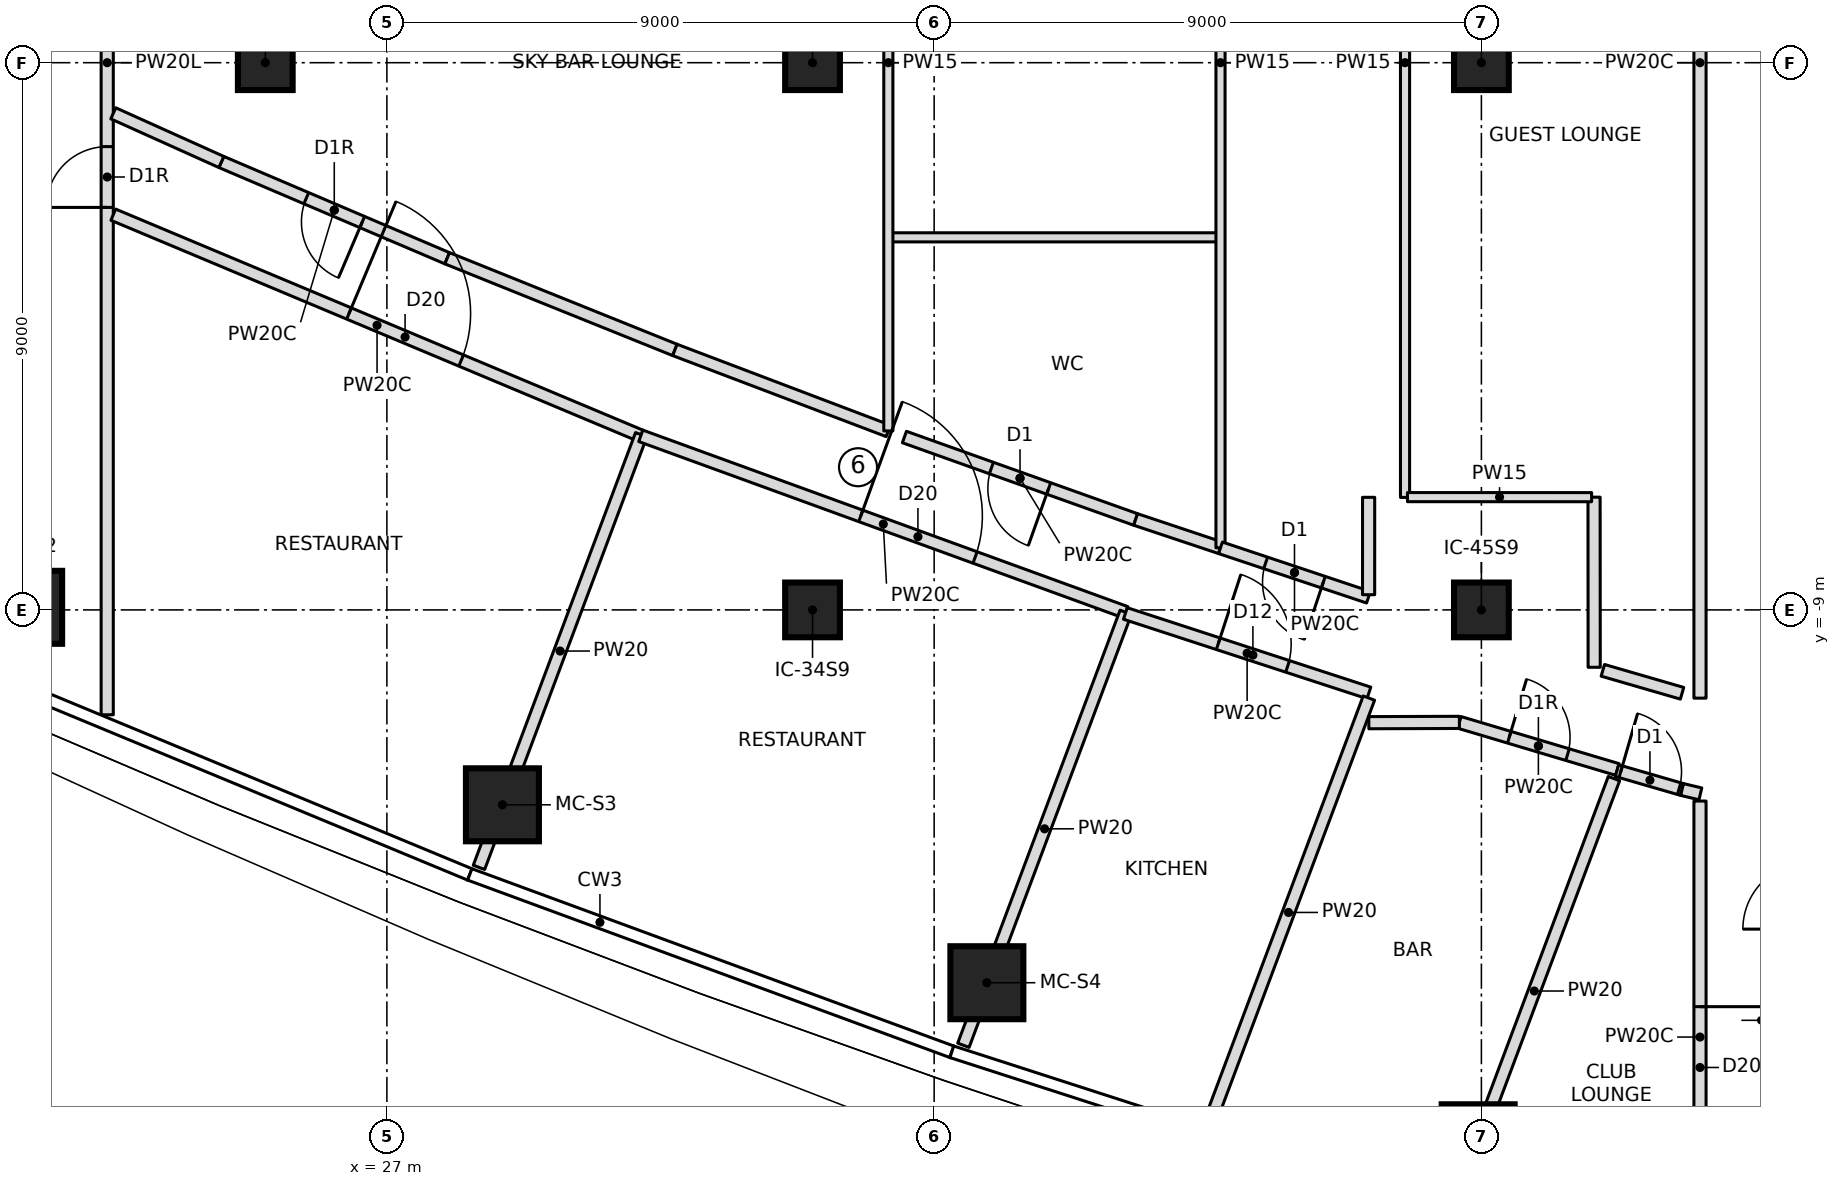
"""IFC4 building model, lengths in metres.
Left out: names, types, materials, properties, quantities, classifications, styles, units other than length and angle.
Written with IfcOpenShell. Run it as: python <this file> out.ifc"""

import sys

from ifc_helpers import new_model, si_unit, direction, frame, frame_2d, origin, origin_2d, place, context, subcontext, project, spatial, rectangle, extrude, element, fill, save


model = new_model("IFC4")
c1 = context("Model", 3, precision=1e-05, world=origin(), true_north=direction((0.0, 1.0)))
c2 = subcontext(c1, "Body", "Model", "MODEL_VIEW")
j1 = project(units=[si_unit("LENGTHUNIT", "METRE"), si_unit("PLANEANGLEUNIT", "RADIAN")], contexts=[c1])
p1 = place(None, origin())
s1 = spatial("IfcSite", under=j1, at=p1, CompositionType="ELEMENT")
p2 = place(p1, origin())
s2 = spatial("IfcBuilding", under=s1, at=p2, CompositionType="ELEMENT")
p3 = place(p2, frame((0.0, 0.0, 216.2)))
s3 = spatial("IfcBuildingStorey", under=s2, at=p3, CompositionType="ELEMENT", Elevation=216.2)
for number, where, z_axis, x_axis in (
    (1, (21.059, -8.958, 0.0), (0.0, 0.0, 1.0), (1.0, 0.0, 0.0)),
    (2, (28.9, -12.205, 0.0), (0.0, 0.0, 1.0), (1.0, 0.0, 0.0)),
    (3, (36.867, -15.132, 0.0), (0.0, 0.0, 1.0), (1.0, 0.0, 0.0)),
    (4, (44.947, -17.731, 0.0), (0.0, 0.0, 1.0), (1.0, 0.0, 0.0)),
):
    element("IfcColumn", number, at=place(p3, frame(where, z_axis=z_axis, x_axis=x_axis)), inside=s3, PredefinedType="COLUMN", context=c2, shape_type="SweptSolid", body=[
        extrude(rectangle(XDim=1.2, YDim=1.2, at=origin_2d()), origin(), (0.0, 0.0, 1.0), 4.6),
    ])
for number, where, z_axis, x_axis in (
    (5, (25.0, 0.0, 0.0), (0.0, 0.0, 1.0), (1.0, 0.0, 0.0)),
    (6, (34.0, -9.0, 0.0), (0.0, 0.0, 1.0), (1.0, 0.0, 0.0)),
    (7, (34.0, 0.0, 0.0), (0.0, 0.0, 1.0), (1.0, 0.0, 0.0)),
    (8, (45.0, -9.0, 0.0), (0.0, 0.0, 1.0), (1.0, 0.0, 0.0)),
    (9, (45.0, 0.0, 0.0), (0.0, 0.0, 1.0), (1.0, 0.0, 0.0)),
):
    element("IfcColumn", number, at=place(p3, frame(where, z_axis=z_axis, x_axis=x_axis)), inside=s3, PredefinedType="COLUMN", context=c2, shape_type="SweptSolid", body=[
        extrude(rectangle(XDim=0.9, YDim=0.9, at=origin_2d()), origin(), (0.0, 0.0, 1.0), 4.6),
    ])
p4 = place(p3, frame((22.401, -10.725, 0.0), z_axis=(0.0, 0.0, 1.0), x_axis=(0.0, 1.0, 0.0)))
e10 = element("IfcWall", 10, at=p4, inside=s3, PredefinedType="PARTITIONING", context=c2, shape_type="SweptSolid", body=[
    extrude(rectangle(XDim=21.45, YDim=0.2, at=frame_2d((10.725, 0.0))), origin(), (0.0, 0.0, 1.0), 4.3),
])
p5 = place(p4, frame((12.106, 0.0, 0.0)))
e11 = element("IfcOpeningElement", 11, at=p5, cuts=e10, PredefinedType="OPENING", context=c2, shape_type="SweptSolid", body=[
    extrude(rectangle(XDim=1.0, YDim=2.1, at=frame_2d((0.5, 1.05))), frame((0.0, 0.11, 0.0), z_axis=(0.0, -1.0, 0.0), x_axis=(1.0, 0.0, 0.0)), (0.0, 0.0, 1.0), 0.22),
])
p6 = place(p4, frame((8.345, 0.0, 0.0)))
e12 = element("IfcOpeningElement", 12, at=p6, cuts=e10, PredefinedType="OPENING", context=c2, shape_type="SweptSolid", body=[
    extrude(rectangle(XDim=1.0, YDim=2.1, at=frame_2d((0.5, 1.05))), frame((0.0, 0.11, 0.0), z_axis=(0.0, -1.0, 0.0), x_axis=(1.0, 0.0, 0.0)), (0.0, 0.0, 1.0), 0.22),
])
p7 = place(p3, frame((22.5, -2.5, 0.0), z_axis=(0.0, 0.0, 1.0), x_axis=(0.922225430975, -0.386652627643, 0.0)))
e13 = element("IfcWall", 13, at=p7, inside=s3, PredefinedType="PARTITIONING", context=c2, shape_type="SweptSolid", body=[
    extrude(rectangle(XDim=9.407, YDim=0.2, at=frame_2d((4.704, 0.0))), origin(), (0.0, 0.0, 1.0), 4.3),
])
p8 = place(p7, frame((4.203, 0.0, 0.0)))
e14 = element("IfcOpeningElement", 14, at=p8, cuts=e13, PredefinedType="OPENING", context=c2, shape_type="SweptSolid", body=[
    extrude(rectangle(XDim=2.0, YDim=2.4, at=frame_2d((1.0, 1.2))), frame((0.0, 0.11, 0.0), z_axis=(0.0, -1.0, 0.0), x_axis=(1.0, 0.0, 0.0)), (0.0, 0.0, 1.0), 0.22),
])
p9 = place(p3, frame((28.514, -13.235, 0.0), z_axis=(0.0, 0.0, 1.0), x_axis=(0.351137522904, 0.936323896955, 0.0)))
e15 = element("IfcWall", 15, at=p9, inside=s3, PredefinedType="PARTITIONING", context=c2, shape_type="SweptSolid", body=[
    extrude(rectangle(XDim=7.6, YDim=0.2, at=frame_2d((3.8, 0.0))), origin(), (0.0, 0.0, 1.0), 4.3),
])
p10 = place(p3, frame((31.176, -6.137, 0.0), z_axis=(0.0, 0.0, 1.0), x_axis=(0.939697645913, -0.342006336585, 0.0)))
e16 = element("IfcWall", 16, at=p10, inside=s3, PredefinedType="PARTITIONING", context=c2, shape_type="SweptSolid", body=[
    extrude(rectangle(XDim=8.488, YDim=0.2, at=frame_2d((4.244, 0.0))), origin(), (0.0, 0.0, 1.0), 4.3),
])
p11 = place(p10, frame((3.85, 0.0, 0.0)))
e17 = element("IfcOpeningElement", 17, at=p11, cuts=e16, PredefinedType="OPENING", context=c2, shape_type="SweptSolid", body=[
    extrude(rectangle(XDim=2.0, YDim=2.4, at=frame_2d((1.0, 1.2))), frame((0.0, 0.11, 0.0), z_axis=(0.0, -1.0, 0.0), x_axis=(1.0, 0.0, 0.0)), (0.0, 0.0, 1.0), 0.22),
])
p12 = place(p3, frame((36.481, -16.161, 0.0), z_axis=(0.0, 0.0, 1.0), x_axis=(0.351133995718, 0.936325219703, 0.0)))
e18 = element("IfcWall", 18, at=p12, inside=s3, PredefinedType="PARTITIONING", context=c2, shape_type="SweptSolid", body=[
    extrude(rectangle(XDim=7.605, YDim=0.2, at=frame_2d((3.803, 0.0))), origin(), (0.0, 0.0, 1.0), 4.3),
])
p13 = place(p3, frame((39.145, -9.059, 0.0), z_axis=(0.0, 0.0, 1.0), x_axis=(0.950709044073, -0.310084365161, 0.0)))
e19 = element("IfcWall", 19, at=p13, inside=s3, PredefinedType="PARTITIONING", context=c2, shape_type="SweptSolid", body=[
    extrude(rectangle(XDim=4.213, YDim=0.2, at=frame_2d((2.106, 0.0))), origin(), (0.0, 0.0, 1.0), 4.3),
])
p14 = place(p13, frame((1.607, 0.0, 0.0)))
e20 = element("IfcOpeningElement", 20, at=p14, cuts=e19, PredefinedType="OPENING", context=c2, shape_type="SweptSolid", body=[
    extrude(rectangle(XDim=1.2, YDim=2.1, at=frame_2d((0.6, 1.05))), frame((0.0, 0.11, 0.0), z_axis=(0.0, -1.0, 0.0), x_axis=(1.0, 0.0, 0.0)), (0.0, 0.0, 1.0), 0.22),
])
p15 = place(p3, frame((40.506, -17.501, 0.0), z_axis=(0.0, 0.0, 1.0), x_axis=(0.351119888923, 0.936330509811, 0.0)))
e21 = element("IfcWall", 21, at=p15, inside=s3, PredefinedType="PARTITIONING", context=c2, shape_type="SweptSolid", body=[
    extrude(rectangle(XDim=7.531, YDim=0.2, at=frame_2d((3.766, 0.0))), origin(), (0.0, 0.0, 1.0), 4.3),
])
p16 = place(p3, frame((44.638, -10.85, 0.0), z_axis=(0.0, 0.0, 1.0), x_axis=(0.95835737874, -0.285571592801, 0.0)))
e22 = element("IfcWall", 22, at=p16, inside=s3, PredefinedType="PARTITIONING", context=c2, shape_type="SweptSolid", body=[
    extrude(rectangle(XDim=2.712, YDim=0.2, at=frame_2d((1.356, 0.0))), origin(), (0.0, 0.0, 1.0), 4.3),
])
p17 = place(p16, frame((0.856, 0.0, 0.0)))
e23 = element("IfcOpeningElement", 23, at=p17, cuts=e22, PredefinedType="OPENING", context=c2, shape_type="SweptSolid", body=[
    extrude(rectangle(XDim=1.0, YDim=2.1, at=frame_2d((0.5, 1.05))), frame((0.0, 0.11, 0.0), z_axis=(0.0, -1.0, 0.0), x_axis=(1.0, 0.0, 0.0)), (0.0, 0.0, 1.0), 0.22),
])
p18 = place(p3, frame((44.56, -18.762, 0.0), z_axis=(0.0, 0.0, 1.0), x_axis=(0.351109100247, 0.936334555447, 0.0)))
e24 = element("IfcWall", 24, at=p18, inside=s3, PredefinedType="PARTITIONING", context=c2, shape_type="SweptSolid", body=[
    extrude(rectangle(XDim=7.462, YDim=0.2, at=frame_2d((3.731, 0.0))), origin(), (0.0, 0.0, 1.0), 4.3),
])
p19 = place(p3, frame((27.992, -3.216, 0.0), z_axis=(0.0, 0.0, 1.0), x_axis=(-0.919906458601, 0.392137867878, 0.0)))
e25 = element("IfcWall", 25, at=p19, inside=s3, PredefinedType="PARTITIONING", context=c2, shape_type="SweptSolid", body=[
    extrude(rectangle(XDim=4.038, YDim=0.2, at=frame_2d((2.019, 0.0))), origin(), (0.0, 0.0, 1.0), 4.3),
])
p20 = place(p19, frame((1.519, 0.0, 0.0)))
e26 = element("IfcOpeningElement", 26, at=p20, cuts=e25, PredefinedType="OPENING", context=c2, shape_type="SweptSolid", body=[
    extrude(rectangle(XDim=1.0, YDim=2.1, at=frame_2d((0.5, 1.05))), frame((0.0, 0.11, 0.0), z_axis=(0.0, -1.0, 0.0), x_axis=(1.0, 0.0, 0.0)), (0.0, 0.0, 1.0), 0.22),
])
p21 = place(p3, frame((31.737, -4.724, 0.0), z_axis=(0.0, 0.0, 1.0), x_axis=(-0.927631817384, 0.37349593221, 0.0)))
e27 = element("IfcWall", 27, at=p21, inside=s3, PredefinedType="PARTITIONING", context=c2, shape_type="SweptSolid", body=[
    extrude(rectangle(XDim=4.037, YDim=0.2, at=frame_2d((2.019, 0.0))), origin(), (0.0, 0.0, 1.0), 4.3),
])
p22 = place(p3, frame((24.278, -1.633, 0.0), z_axis=(0.0, 0.0, 1.0), x_axis=(-0.911806621171, 0.410619879681, 0.0)))
e28 = element("IfcWall", 28, at=p22, inside=s3, PredefinedType="PARTITIONING", context=c2, shape_type="SweptSolid", body=[
    extrude(rectangle(XDim=1.949, YDim=0.2, at=frame_2d((0.975, 0.0))), origin(), (0.0, 0.0, 1.0), 4.3),
])
p23 = place(p3, frame((35.247, -6.056, 0.0), z_axis=(0.0, 0.0, 1.0), x_axis=(-0.934948443449, 0.354783607418, 0.0)))
e29 = element("IfcWall", 29, at=p23, inside=s3, PredefinedType="PARTITIONING", context=c2, shape_type="SweptSolid", body=[
    extrude(rectangle(XDim=3.754, YDim=0.2, at=frame_2d((1.877, 0.0))), origin(), (0.0, 0.0, 1.0), 4.3),
])
p24 = place(p3, frame((35.247, -2.872, 0.0), z_axis=(0.0, 0.0, 1.0), x_axis=(1.0, 0.0, 0.0)))
e30 = element("IfcWall", 30, at=p24, inside=s3, PredefinedType="PARTITIONING", context=c2, shape_type="SweptSolid", body=[
    extrude(rectangle(XDim=5.463, YDim=0.15, at=frame_2d((2.731, 0.0))), origin(), (0.0, 0.0, 1.0), 4.3),
])
p25 = place(p3, frame((35.247, -6.056, 0.0), z_axis=(0.0, 0.0, 1.0), x_axis=(0.0, 1.0, 0.0)))
e31 = element("IfcWall", 31, at=p25, inside=s3, PredefinedType="PARTITIONING", context=c2, shape_type="SweptSolid", body=[
    extrude(rectangle(XDim=12.112, YDim=0.15, at=frame_2d((6.056, 0.0))), origin(), (0.0, 0.0, 1.0), 4.3),
])
p26 = place(p3, frame((39.314, -7.512, 0.0), z_axis=(0.0, 0.0, 1.0), x_axis=(-0.941904619678, 0.335880465983, 0.0)))
e32 = element("IfcWall", 32, at=p26, inside=s3, PredefinedType="PARTITIONING", context=c2, shape_type="SweptSolid", body=[
    extrude(rectangle(XDim=4.037, YDim=0.2, at=frame_2d((2.019, 0.0))), origin(), (0.0, 0.0, 1.0), 4.3),
])
p27 = place(p26, frame((1.519, 0.0, 0.0)))
e33 = element("IfcOpeningElement", 33, at=p27, cuts=e32, PredefinedType="OPENING", context=c2, shape_type="SweptSolid", body=[
    extrude(rectangle(XDim=1.0, YDim=2.1, at=frame_2d((0.5, 1.05))), frame((0.0, 0.11, 0.0), z_axis=(0.0, -1.0, 0.0), x_axis=(1.0, 0.0, 0.0)), (0.0, 0.0, 1.0), 0.22),
])
p28 = place(p3, frame((40.709, -7.979, 0.0), z_axis=(0.0, 0.0, 1.0), x_axis=(-0.94846740352, 0.316874714137, 0.0)))
e34 = element("IfcWall", 34, at=p28, inside=s3, PredefinedType="PARTITIONING", context=c2, shape_type="SweptSolid", body=[
    extrude(rectangle(XDim=1.472, YDim=0.2, at=frame_2d((0.736, 0.0))), origin(), (0.0, 0.0, 1.0), 4.3),
])
p29 = place(p3, frame((40.709, -7.979, 0.0), z_axis=(0.0, 0.0, 1.0), x_axis=(0.0, 1.0, 0.0)))
e35 = element("IfcWall", 35, at=p29, inside=s3, PredefinedType="PARTITIONING", context=c2, shape_type="SweptSolid", body=[
    extrude(rectangle(XDim=15.958, YDim=0.15, at=frame_2d((7.979, 0.0))), origin(), (0.0, 0.0, 1.0), 4.3),
])
p30 = place(p3, frame((43.143, -8.792, 0.0), z_axis=(0.0, 0.0, 1.0), x_axis=(-0.948473756095, 0.316855699016, 0.0)))
e36 = element("IfcWall", 36, at=p30, inside=s3, PredefinedType="PARTITIONING", context=c2, shape_type="SweptSolid", body=[
    extrude(rectangle(XDim=2.566, YDim=0.2, at=frame_2d((1.283, 0.0))), origin(), (0.0, 0.0, 1.0), 4.3),
])
p31 = place(p30, frame((0.783, 0.0, 0.0)))
e37 = element("IfcOpeningElement", 37, at=p31, cuts=e36, PredefinedType="OPENING", context=c2, shape_type="SweptSolid", body=[
    extrude(rectangle(XDim=1.0, YDim=2.1, at=frame_2d((0.5, 1.05))), frame((0.0, 0.11, 0.0), z_axis=(0.0, -1.0, 0.0), x_axis=(1.0, 0.0, 0.0)), (0.0, 0.0, 1.0), 0.22),
])
p32 = place(p3, frame((43.744, -7.15, 0.0), z_axis=(0.0, 0.0, 1.0), x_axis=(0.0, 1.0, 0.0)))
e38 = element("IfcWall", 38, at=p32, inside=s3, PredefinedType="PARTITIONING", context=c2, shape_type="SweptSolid", body=[
    extrude(rectangle(XDim=14.3, YDim=0.15, at=frame_2d((7.15, 0.0))), origin(), (0.0, 0.0, 1.0), 4.3),
])
p33 = place(p3, frame((47.23, -11.643, 0.0), z_axis=(0.0, 0.0, 1.0), x_axis=(0.960450233741, -0.278451698696, 0.0)))
e39 = element("IfcWall", 39, at=p33, inside=s3, PredefinedType="PARTITIONING", context=c2, shape_type="SweptSolid", body=[
    extrude(rectangle(XDim=1.115, YDim=0.2, at=frame_2d((0.557, 0.0))), origin(), (0.0, 0.0, 1.0), 4.3),
])
p34 = place(p33, frame((0.064, 0.0, 0.0)))
e40 = element("IfcOpeningElement", 40, at=p34, cuts=e39, PredefinedType="OPENING", context=c2, shape_type="SweptSolid", body=[
    extrude(rectangle(XDim=1.0, YDim=2.1, at=frame_2d((0.5, 1.05))), frame((0.0, 0.11, 0.0), z_axis=(0.0, -1.0, 0.0), x_axis=(1.0, 0.0, 0.0)), (0.0, 0.0, 1.0), 0.22),
])
p35 = place(p3, frame((48.3, -10.371, 0.0), z_axis=(0.0, 0.0, 1.0), x_axis=(-0.960450321583, 0.278451395706, 0.0)))
e41 = element("IfcWall", 41, at=p35, inside=s3, PredefinedType="PARTITIONING", context=c2, shape_type="SweptSolid", body=[
    extrude(rectangle(XDim=1.356, YDim=0.2, at=frame_2d((0.678, 0.0))), origin(), (0.0, 0.0, 1.0), 4.3),
])
p36 = place(p3, frame((43.146, -7.148, 0.0), z_axis=(0.0, 0.0, 1.0), x_axis=(-0.000304785112, -0.999999953553, 0.0)))
e42 = element("IfcWall", 42, at=p36, inside=s3, PredefinedType="PARTITIONING", context=c2, shape_type="SweptSolid", body=[
    extrude(rectangle(XDim=1.602, YDim=0.2, at=frame_2d((0.801, 0.0))), origin(), (0.0, 0.0, 1.0), 4.3),
])
p37 = place(p3, frame((48.595, 10.451, 0.0), z_axis=(0.0, 0.0, 1.0), x_axis=(0.0, -1.0, 0.0)))
e43 = element("IfcWall", 43, at=p37, inside=s3, PredefinedType="PARTITIONING", context=c2, shape_type="SweptSolid", body=[
    extrude(rectangle(XDim=20.903, YDim=0.2, at=frame_2d((10.451, 0.0))), origin(), (0.0, 0.0, 1.0), 4.3),
])
p38 = place(p3, frame((46.855, -9.944, 0.0), z_axis=(0.0, 0.0, 1.0), x_axis=(-0.000785271549, 0.999999691674, 0.0)))
e44 = element("IfcWall", 44, at=p38, inside=s3, PredefinedType="PARTITIONING", context=c2, shape_type="SweptSolid", body=[
    extrude(rectangle(XDim=2.798, YDim=0.2, at=frame_2d((1.399, 0.0))), origin(), (0.0, 0.0, 1.0), 4.3),
])
p39 = place(p3, frame((46.813, -7.146, 0.0), z_axis=(0.0, 0.0, 1.0), x_axis=(-0.999999970757, 0.000241837961, 0.0)))
e45 = element("IfcWall", 45, at=p39, inside=s3, PredefinedType="PARTITIONING", context=c2, shape_type="SweptSolid", body=[
    extrude(rectangle(XDim=3.029, YDim=0.15, at=frame_2d((1.514, 0.0))), origin(), (0.0, 0.0, 1.0), 4.3),
])
p40 = place(p3, frame((43.148, -10.855, 0.0), z_axis=(0.0, 0.0, 1.0), x_axis=(0.999995150779, 0.003114228465, 0.0)))
e46 = element("IfcWall", 46, at=p40, inside=s3, PredefinedType="PARTITIONING", context=c2, shape_type="SweptSolid", body=[
    extrude(rectangle(XDim=1.49, YDim=0.2, at=frame_2d((0.745, 0.0))), origin(), (0.0, 0.0, 1.0), 4.3),
])
p41 = place(p3, frame((48.3, -11.954, 0.0), z_axis=(0.0, 0.0, 1.0), x_axis=(0.972991873737, -0.230839367615, 0.0)))
e47 = element("IfcWall", 47, at=p41, inside=s3, PredefinedType="PARTITIONING", context=c2, shape_type="SweptSolid", body=[
    extrude(rectangle(XDim=0.31, YDim=0.2, at=frame_2d((0.155, 0.0))), origin(), (0.0, 0.0, 1.0), 4.3),
])
p42 = place(p3, frame((48.595, -12.144, 0.0), z_axis=(0.0, 0.0, 1.0), x_axis=(0.0, -1.0, 0.0)))
e48 = element("IfcWall", 48, at=p42, inside=s3, PredefinedType="PARTITIONING", context=c2, shape_type="SweptSolid", body=[
    extrude(rectangle(XDim=7.763, YDim=0.2, at=frame_2d((3.882, 0.0))), origin(), (0.0, 0.0, 1.0), 4.3),
])
p43 = place(p42, frame((3.382, 0.0, 0.0)))
e49 = element("IfcOpeningElement", 49, at=p43, cuts=e48, PredefinedType="OPENING", context=c2, shape_type="SweptSolid", body=[
    extrude(rectangle(XDim=2.0, YDim=2.4, at=frame_2d((1.0, 1.2))), frame((0.0, 0.11, 0.0), z_axis=(0.0, -1.0, 0.0), x_axis=(1.0, 0.0, 0.0)), (0.0, 0.0, 1.0), 0.22),
])
p44 = place(p6, origin())
e50 = element("IfcDoor", 50, at=p44, inside=s3, OperationType="SINGLE_SWING_RIGHT", PredefinedType="DOOR", context=c2, shape_type="SweptSolid", body=[
    extrude(rectangle(XDim=1.0, YDim=2.1, at=frame_2d((0.5, 1.05))), frame((0.0, 0.025, 0.0), z_axis=(0.0, -1.0, 0.0), x_axis=(1.0, 0.0, 0.0)), (0.0, 0.0, 1.0), 0.05),
])
fill(e12, e50)
p45 = place(p8, origin())
e51 = element("IfcDoor", 51, at=p45, inside=s3, OperationType="DOUBLE_DOOR_SINGLE_SWING", PredefinedType="DOOR", context=c2, shape_type="SweptSolid", body=[
    extrude(rectangle(XDim=2.0, YDim=2.4, at=frame_2d((1.0, 1.2))), frame((0.0, 0.025, 0.0), z_axis=(0.0, -1.0, 0.0), x_axis=(1.0, 0.0, 0.0)), (0.0, 0.0, 1.0), 0.05),
])
fill(e14, e51)
p46 = place(p11, origin())
e52 = element("IfcDoor", 52, at=p46, inside=s3, OperationType="DOUBLE_DOOR_SINGLE_SWING", PredefinedType="DOOR", context=c2, shape_type="SweptSolid", body=[
    extrude(rectangle(XDim=2.0, YDim=2.4, at=frame_2d((1.0, 1.2))), frame((0.0, 0.025, 0.0), z_axis=(0.0, -1.0, 0.0), x_axis=(1.0, 0.0, 0.0)), (0.0, 0.0, 1.0), 0.05),
])
fill(e17, e52)
p47 = place(p14, origin())
e53 = element("IfcDoor", 53, at=p47, inside=s3, OperationType="SINGLE_SWING_RIGHT", PredefinedType="DOOR", context=c2, shape_type="SweptSolid", body=[
    extrude(rectangle(XDim=1.2, YDim=2.1, at=frame_2d((0.6, 1.05))), frame((0.0, 0.025, 0.0), z_axis=(0.0, -1.0, 0.0), x_axis=(1.0, 0.0, 0.0)), (0.0, 0.0, 1.0), 0.05),
])
fill(e20, e53)
p48 = place(p17, origin())
e54 = element("IfcDoor", 54, at=p48, inside=s3, OperationType="SINGLE_SWING_RIGHT", PredefinedType="DOOR", context=c2, shape_type="SweptSolid", body=[
    extrude(rectangle(XDim=1.0, YDim=2.1, at=frame_2d((0.5, 1.05))), frame((0.0, 0.025, 0.0), z_axis=(0.0, -1.0, 0.0), x_axis=(1.0, 0.0, 0.0)), (0.0, 0.0, 1.0), 0.05),
])
fill(e23, e54)
p49 = place(p34, origin())
e55 = element("IfcDoor", 55, at=p49, inside=s3, OperationType="SINGLE_SWING_LEFT", PredefinedType="DOOR", context=c2, shape_type="SweptSolid", body=[
    extrude(rectangle(XDim=1.0, YDim=2.1, at=frame_2d((0.5, 1.05))), frame((0.0, 0.025, 0.0), z_axis=(0.0, -1.0, 0.0), x_axis=(1.0, 0.0, 0.0)), (0.0, 0.0, 1.0), 0.05),
])
fill(e40, e55)
p50 = place(p20, origin())
e56 = element("IfcDoor", 56, at=p50, inside=s3, OperationType="SINGLE_SWING_RIGHT", PredefinedType="DOOR", context=c2, shape_type="SweptSolid", body=[
    extrude(rectangle(XDim=1.0, YDim=2.1, at=frame_2d((0.5, 1.05))), frame((0.0, 0.025, 0.0), z_axis=(0.0, -1.0, 0.0), x_axis=(1.0, 0.0, 0.0)), (0.0, 0.0, 1.0), 0.05),
])
fill(e26, e56)
p51 = place(p27, origin())
e57 = element("IfcDoor", 57, at=p51, inside=s3, OperationType="SINGLE_SWING_LEFT", PredefinedType="DOOR", context=c2, shape_type="SweptSolid", body=[
    extrude(rectangle(XDim=1.0, YDim=2.1, at=frame_2d((0.5, 1.05))), frame((0.0, 0.025, 0.0), z_axis=(0.0, -1.0, 0.0), x_axis=(1.0, 0.0, 0.0)), (0.0, 0.0, 1.0), 0.05),
])
fill(e33, e57)
p52 = place(p31, origin())
e58 = element("IfcDoor", 58, at=p52, inside=s3, OperationType="SINGLE_SWING_LEFT", PredefinedType="DOOR", context=c2, shape_type="SweptSolid", body=[
    extrude(rectangle(XDim=1.0, YDim=2.1, at=frame_2d((0.5, 1.05))), frame((0.0, 0.025, 0.0), z_axis=(0.0, -1.0, 0.0), x_axis=(1.0, 0.0, 0.0)), (0.0, 0.0, 1.0), 0.05),
])
fill(e37, e58)
p53 = place(p43, origin())
e59 = element("IfcDoor", 59, at=p53, inside=s3, OperationType="DOUBLE_DOOR_SINGLE_SWING", PredefinedType="DOOR", context=c2, shape_type="SweptSolid", body=[
    extrude(rectangle(XDim=2.0, YDim=2.4, at=frame_2d((1.0, 1.2))), frame((0.0, 0.025, 0.0), z_axis=(0.0, -1.0, 0.0), x_axis=(1.0, 0.0, 0.0)), (0.0, 0.0, 1.0), 0.05),
])
fill(e49, e59)
save(model, sys.argv[1])
